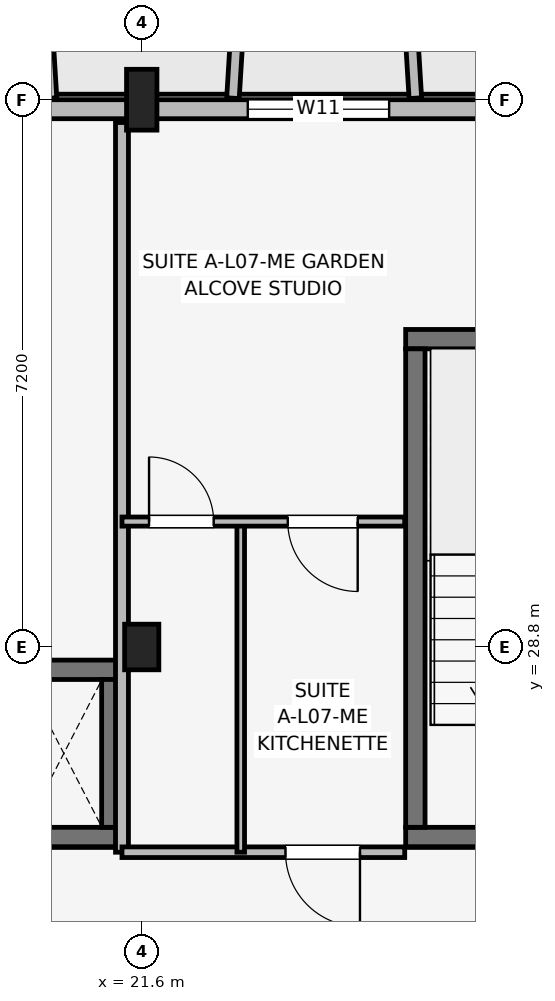
"""IFC4 building model, lengths in metres.
Left out: names, types, materials, properties, quantities, classifications, styles, units other than length and angle.
Written with IfcOpenShell. Run it as: python <this file> out.ifc"""

import sys

from ifc_helpers import new_model, si_unit, direction, frame, frame_2d, origin, origin_2d, place, context, subcontext, project, spatial, rectangle, extrude, element, fill, save


model = new_model("IFC4")
c1 = context("Model", 3, precision=1e-05, world=origin(), true_north=direction((0.0, 1.0)))
c2 = subcontext(c1, "Body", "Model", "MODEL_VIEW")
j1 = project(units=[si_unit("LENGTHUNIT", "METRE"), si_unit("PLANEANGLEUNIT", "RADIAN")], contexts=[c1])
p1 = place(None, origin())
s1 = spatial("IfcSite", under=j1, at=p1, CompositionType="ELEMENT")
p2 = place(p1, origin())
s2 = spatial("IfcBuilding", under=s1, at=p2, CompositionType="ELEMENT")
p3 = place(p2, frame((0.0, 0.0, 24.45)))
s3 = spatial("IfcBuildingStorey", under=s2, at=p3, CompositionType="ELEMENT", Elevation=24.45)
p4 = place(p3, frame((21.6, 28.8, 0.0), z_axis=(0.0, 0.0, 1.0), x_axis=(1.0, 0.0, 0.0)))
e1 = element("IfcColumn", 1, at=p4, inside=s3, PredefinedType="COLUMN", context=c2, shape_type="SweptSolid", body=[
    extrude(rectangle(XDim=0.45, YDim=0.6, at=origin_2d()), origin(), (0.0, 0.0, 1.0), 3.15),
])
p5 = place(p3, frame((21.6, 36.0, 0.0), z_axis=(0.0, 0.0, 1.0), x_axis=(1.0, 0.0, 0.0)))
e2 = element("IfcColumn", 2, at=p5, inside=s3, PredefinedType="COLUMN", context=c2, shape_type="SweptSolid", body=[
    extrude(rectangle(XDim=0.4, YDim=0.8, at=origin_2d()), origin(), (0.0, 0.0, 1.0), 3.15),
])
p6 = place(p3, frame((25.073, 26.3, 0.0), z_axis=(0.0, 0.0, 1.0), x_axis=(1.0, 0.0, 0.0)))
e3 = element("IfcWall", 3, at=p6, inside=s3, PredefinedType="SHEAR", context=c2, shape_type="SweptSolid", body=[
    extrude(rectangle(XDim=3.305, YDim=0.255, at=frame_2d((1.652, 0.0))), origin(), (0.0, 0.0, 1.0), 3.15),
])
p7 = place(p6, frame((1.127, 0.0, 0.0)))
e4 = element("IfcOpeningElement", 4, at=p7, cuts=e3, PredefinedType="OPENING", context=c2, shape_type="SweptSolid", body=[
    extrude(rectangle(XDim=1.05, YDim=2.12, at=frame_2d((0.525, 1.06))), frame((0.0, 0.137, 0.0), z_axis=(0.0, -1.0, 0.0), x_axis=(1.0, 0.0, 0.0)), (0.0, 0.0, 1.0), 0.275),
])
p8 = place(p3, frame((25.073, 32.85, 0.0), z_axis=(0.0, 0.0, 1.0), x_axis=(1.0, 0.0, 0.0)))
e5 = element("IfcWall", 5, at=p8, inside=s3, PredefinedType="SHEAR", context=c2, shape_type="SweptSolid", body=[
    extrude(rectangle(XDim=3.305, YDim=0.255, at=frame_2d((1.652, 0.0))), origin(), (0.0, 0.0, 1.0), 3.15),
])
p9 = place(p3, frame((25.2, 26.427, 0.0), z_axis=(0.0, 0.0, 1.0), x_axis=(0.0, 1.0, 0.0)))
e6 = element("IfcWall", 6, at=p9, inside=s3, PredefinedType="SHEAR", context=c2, shape_type="SweptSolid", body=[
    extrude(rectangle(XDim=6.295, YDim=0.255, at=frame_2d((3.147, 0.0))), origin(), (0.0, 0.0, 1.0), 3.15),
])
for number, where, z_axis, x_axis in (
    (7, (19.522, 26.3, 0.0), (0.0, 0.0, 1.0), (1.0, 0.0, 0.0)),
    (8, (19.522, 28.5, 0.0), (0.0, 0.0, 1.0), (1.0, 0.0, 0.0)),
):
    element("IfcWall", number, at=place(p3, frame(where, z_axis=z_axis, x_axis=x_axis)), inside=s3, PredefinedType="SHEAR", context=c2, shape_type="SweptSolid", body=[
        extrude(rectangle(XDim=1.805, YDim=0.255, at=frame_2d((0.902, 0.0))), origin(), (0.0, 0.0, 1.0), 3.15),
    ])
p10 = place(p3, frame((21.2, 26.427, 0.0), z_axis=(0.0, 0.0, 1.0), x_axis=(0.0, 1.0, 0.0)))
e9 = element("IfcWall", 9, at=p10, inside=s3, PredefinedType="SHEAR", context=c2, shape_type="SweptSolid", body=[
    extrude(rectangle(XDim=1.945, YDim=0.255, at=frame_2d((0.973, 0.0))), origin(), (0.0, 0.0, 1.0), 3.15),
])
p11 = place(p3, frame((32.6, 35.875, 0.0), z_axis=(0.0, 0.0, 1.0), x_axis=(-1.0, 0.0, 0.0)))
e10 = element("IfcWall", 10, at=p11, inside=s3, PredefinedType="SOLIDWALL", context=c2, shape_type="SweptSolid", body=[
    extrude(rectangle(XDim=29.2, YDim=0.25, at=frame_2d((14.6, 0.0))), origin(), (0.0, 0.0, 1.0), 2.43),
])
p12 = place(p11, frame((28.7, 0.0, 0.0), z_axis=(0.0, 0.0, 1.0), x_axis=(-1.0, 0.0, 0.0)))
e11 = element("IfcOpeningElement", 11, at=p12, cuts=e10, PredefinedType="OPENING", context=c2, shape_type="SweptSolid", body=[
    extrude(rectangle(XDim=1.8, YDim=2.15, at=frame_2d((0.9, 1.075))), frame((0.0, 0.135, 0.0), z_axis=(0.0, -1.0, 0.0), x_axis=(1.0, 0.0, 0.0)), (0.0, 0.0, 1.0), 0.27),
])
p13 = place(p11, frame((2.15, 0.0, 0.0), z_axis=(0.0, 0.0, 1.0), x_axis=(-1.0, 0.0, 0.0)))
e12 = element("IfcOpeningElement", 12, at=p13, cuts=e10, PredefinedType="OPENING", context=c2, shape_type="SweptSolid", body=[
    extrude(rectangle(XDim=1.5, YDim=2.15, at=frame_2d((0.75, 1.075))), frame((0.0, 0.135, 0.0), z_axis=(0.0, -1.0, 0.0), x_axis=(1.0, 0.0, 0.0)), (0.0, 0.0, 1.0), 0.27),
])
p14 = place(p11, frame((14.955, 0.0, 0.5)))
e13 = element("IfcOpeningElement", 13, at=p14, cuts=e10, PredefinedType="OPENING", context=c2, shape_type="SweptSolid", body=[
    extrude(rectangle(XDim=0.9, YDim=1.8, at=frame_2d((0.45, 0.9))), frame((0.0, 0.135, 0.0), z_axis=(0.0, -1.0, 0.0), x_axis=(1.0, 0.0, 0.0)), (0.0, 0.0, 1.0), 0.27),
])
p15 = place(p11, frame((7.745, 0.0, 0.7)))
e14 = element("IfcOpeningElement", 14, at=p15, cuts=e10, PredefinedType="OPENING", context=c2, shape_type="SweptSolid", body=[
    extrude(rectangle(XDim=1.86, YDim=1.6, at=frame_2d((0.93, 0.8))), frame((0.0, 0.135, 0.0), z_axis=(0.0, -1.0, 0.0), x_axis=(1.0, 0.0, 0.0)), (0.0, 0.0, 1.0), 0.27),
])
p16 = place(p11, frame((19.57, 0.0, 0.7)))
e15 = element("IfcOpeningElement", 15, at=p16, cuts=e10, PredefinedType="OPENING", context=c2, shape_type="SweptSolid", body=[
    extrude(rectangle(XDim=1.86, YDim=1.6, at=frame_2d((0.93, 0.8))), frame((0.0, 0.135, 0.0), z_axis=(0.0, -1.0, 0.0), x_axis=(1.0, 0.0, 0.0)), (0.0, 0.0, 1.0), 0.27),
])
p17 = place(p3, frame((20.4, 36.02, 0.0), z_axis=(0.0, 0.0, 1.0), x_axis=(-0.061046865508, 0.998134900808, 0.0)))
e16 = element("IfcWall", 16, at=p17, inside=s3, PredefinedType="ELEMENTEDWALL", context=c2, shape_type="SweptSolid", body=[
    extrude(rectangle(XDim=1.964, YDim=0.165, at=frame_2d((0.982, 0.0))), origin(), (0.0, 0.0, 1.0), 2.55),
])
for number, where, z_axis, x_axis in (
    (17, (22.8, 36.02, 0.0), (0.0, 0.0, 1.0), (0.061, 0.998, 0.0)),
    (18, (25.2, 36.02, 0.0), (0.0, 0.0, 1.0), (-0.061, 0.998, 0.0)),
):
    element("IfcWall", number, at=place(p3, frame(where, z_axis=z_axis, x_axis=x_axis)), inside=s3, PredefinedType="ELEMENTEDWALL", context=c2, shape_type="SweptSolid", body=[
        extrude(rectangle(XDim=1.964, YDim=0.165, at=frame_2d((0.982, 0.0))), origin(), (0.0, 0.0, 1.0), 2.58),
    ])
p18 = place(p3, frame((21.34, 26.1, 0.0), z_axis=(0.0, 0.0, 1.0), x_axis=(0.0, 1.0, 0.0)))
e19 = element("IfcWall", 19, at=p18, inside=s3, PredefinedType="PARTITIONING", context=c2, shape_type="SweptSolid", body=[
    extrude(rectangle(XDim=9.6, YDim=0.17, at=frame_2d((4.8, 0.0))), origin(), (0.0, 0.0, 1.0), 2.38),
])
p19 = place(p3, frame((21.34, 26.1, 0.0), z_axis=(0.0, 0.0, 1.0), x_axis=(1.0, 0.0, 0.0)))
e20 = element("IfcWall", 20, at=p19, inside=s3, PredefinedType="PARTITIONING", context=c2, shape_type="SweptSolid", body=[
    extrude(rectangle(XDim=3.72, YDim=0.14, at=frame_2d((1.86, 0.0))), origin(), (0.0, 0.0, 1.0), 2.38),
])
p20 = place(p19, frame((3.131, 0.0, 0.0), z_axis=(0.0, 0.0, 1.0), x_axis=(-1.0, 0.0, 0.0)))
e21 = element("IfcOpeningElement", 21, at=p20, cuts=e20, PredefinedType="OPENING", context=c2, shape_type="SweptSolid", body=[
    extrude(rectangle(XDim=0.98, YDim=2.1, at=frame_2d((0.49, 1.05))), frame((0.0, 0.08, 0.0), z_axis=(0.0, -1.0, 0.0), x_axis=(1.0, 0.0, 0.0)), (0.0, 0.0, 1.0), 0.16),
])
p21 = place(p3, frame((22.902, 26.1, 0.0), z_axis=(0.0, 0.0, 1.0), x_axis=(0.0, 1.0, 0.0)))
e22 = element("IfcWall", 22, at=p21, inside=s3, PredefinedType="PARTITIONING", context=c2, shape_type="SweptSolid", body=[
    extrude(rectangle(XDim=4.35, YDim=0.1, at=frame_2d((2.175, 0.0))), origin(), (0.0, 0.0, 1.0), 2.38),
])
p22 = place(p3, frame((21.34, 30.45, 0.0), z_axis=(0.0, 0.0, 1.0), x_axis=(1.0, 0.0, 0.0)))
e23 = element("IfcWall", 23, at=p22, inside=s3, PredefinedType="PARTITIONING", context=c2, shape_type="SweptSolid", body=[
    extrude(rectangle(XDim=3.72, YDim=0.12, at=frame_2d((1.86, 0.0))), origin(), (0.0, 0.0, 1.0), 2.38),
])
p23 = place(p22, frame((0.356, 0.0, 0.0)))
e24 = element("IfcOpeningElement", 24, at=p23, cuts=e23, PredefinedType="OPENING", context=c2, shape_type="SweptSolid", body=[
    extrude(rectangle(XDim=0.85, YDim=2.08, at=frame_2d((0.425, 1.04))), frame((0.0, 0.07, 0.0), z_axis=(0.0, -1.0, 0.0), x_axis=(1.0, 0.0, 0.0)), (0.0, 0.0, 1.0), 0.14),
])
p24 = place(p22, frame((3.101, 0.0, 0.0), z_axis=(0.0, 0.0, 1.0), x_axis=(-1.0, 0.0, 0.0)))
e25 = element("IfcOpeningElement", 25, at=p24, cuts=e23, PredefinedType="OPENING", context=c2, shape_type="SweptSolid", body=[
    extrude(rectangle(XDim=0.92, YDim=2.08, at=frame_2d((0.46, 1.04))), frame((0.0, 0.07, 0.0), z_axis=(0.0, -1.0, 0.0), x_axis=(1.0, 0.0, 0.0)), (0.0, 0.0, 1.0), 0.14),
])
p25 = place(p15, origin())
e26 = element("IfcWindow", 26, at=p25, inside=s3, PartitioningType="SINGLE_PANEL", PredefinedType="WINDOW", context=c2, shape_type="SweptSolid", body=[
    extrude(rectangle(XDim=1.86, YDim=1.6, at=frame_2d((0.93, 0.8))), frame((0.0, 0.03, 0.0), z_axis=(0.0, -1.0, 0.0), x_axis=(1.0, 0.0, 0.0)), (0.0, 0.0, 1.0), 0.06),
])
fill(e14, e26)
p26 = place(p20, origin())
e27 = element("IfcDoor", 27, at=p26, inside=s3, OperationType="SINGLE_SWING_RIGHT", PredefinedType="DOOR", context=c2, shape_type="SweptSolid", body=[
    extrude(rectangle(XDim=0.98, YDim=2.1, at=frame_2d((0.49, 1.05))), frame((0.0, 0.025, 0.0), z_axis=(0.0, -1.0, 0.0), x_axis=(1.0, 0.0, 0.0)), (0.0, 0.0, 1.0), 0.05),
])
fill(e21, e27)
p27 = place(p23, origin())
e28 = element("IfcDoor", 28, at=p27, inside=s3, OperationType="SINGLE_SWING_LEFT", PredefinedType="DOOR", context=c2, shape_type="SweptSolid", body=[
    extrude(rectangle(XDim=0.85, YDim=2.08, at=frame_2d((0.425, 1.04))), frame((0.0, 0.025, 0.0), z_axis=(0.0, -1.0, 0.0), x_axis=(1.0, 0.0, 0.0)), (0.0, 0.0, 1.0), 0.05),
])
fill(e24, e28)
p28 = place(p24, origin())
e29 = element("IfcDoor", 29, at=p28, inside=s3, OperationType="SINGLE_SWING_RIGHT", PredefinedType="DOOR", context=c2, shape_type="SweptSolid", body=[
    extrude(rectangle(XDim=0.92, YDim=2.08, at=frame_2d((0.46, 1.04))), frame((0.0, 0.025, 0.0), z_axis=(0.0, -1.0, 0.0), x_axis=(1.0, 0.0, 0.0)), (0.0, 0.0, 1.0), 0.05),
])
fill(e25, e29)
save(model, sys.argv[1])
